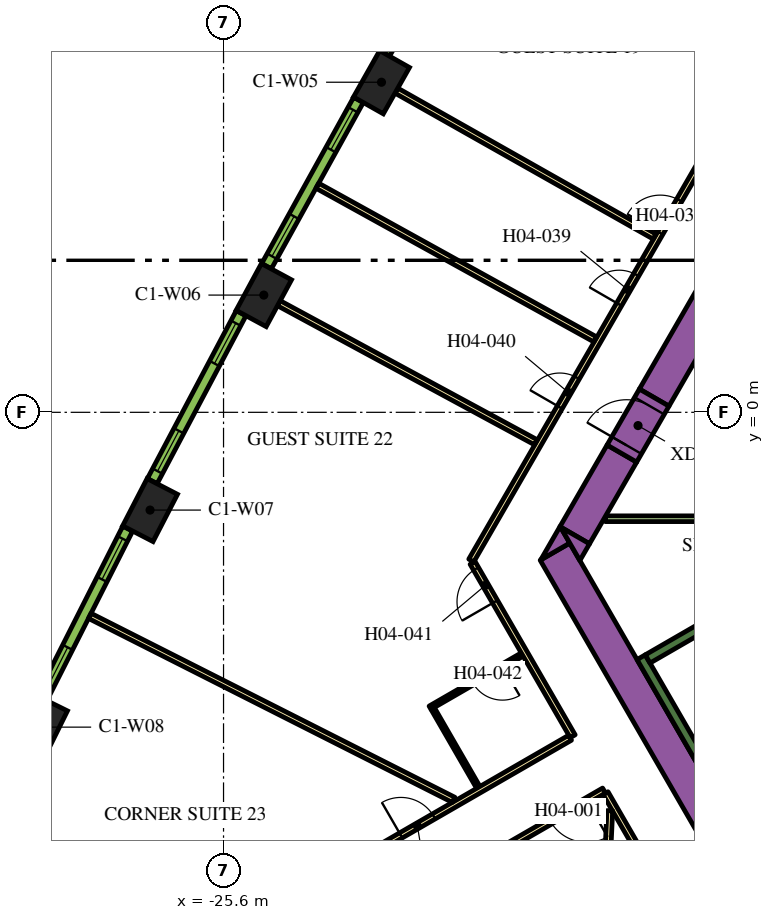
"""IFC4 building model, lengths in metres.
Left out: names, types, materials, properties, quantities, classifications, styles, units other than length and angle.
Written with IfcOpenShell. Run it as: python <this file> out.ifc"""

import sys

from ifc_helpers import new_model, si_unit, direction, frame, frame_2d, origin, origin_2d, place, context, subcontext, project, spatial, polyline, rectangle, outline, extrude, element, fill, save


model = new_model("IFC4")
c1 = context("Model", 3, precision=1e-05, world=origin(), true_north=direction((0.0, 1.0)))
c2 = subcontext(c1, "Body", "Model", "MODEL_VIEW")
j1 = project(units=[si_unit("LENGTHUNIT", "METRE"), si_unit("PLANEANGLEUNIT", "RADIAN")], contexts=[c1])
p1 = place(None, origin())
s1 = spatial("IfcSite", under=j1, at=p1, CompositionType="ELEMENT")
p2 = place(p1, origin())
s2 = spatial("IfcBuilding", under=s1, at=p2, CompositionType="ELEMENT")
p3 = place(p2, frame((0.0, 0.0, 62.7)))
s3 = spatial("IfcBuildingStorey", under=s2, at=p3, CompositionType="ELEMENT", Elevation=62.7)
for number, where, z_axis, x_axis in (
    (1, (-21.443, 8.685, 0.0), (0.0, 0.0, 1.0), (-0.492, -0.871, 0.0)),
    (2, (-24.54, 3.085, 0.0), (0.0, 0.0, 1.0), (-0.476, -0.88, 0.0)),
    (3, (-27.533, -2.572, 0.0), (0.0, 0.0, 1.0), (-0.459, -0.888, 0.0)),
    (4, (-30.421, -8.284, 0.0), (0.0, 0.0, 1.0), (-0.443, -0.897, 0.0)),
):
    element("IfcColumn", number, at=place(p3, frame(where, z_axis=z_axis, x_axis=x_axis)), inside=s3, PredefinedType="COLUMN", context=c2, shape_type="SweptSolid", body=[
        extrude(rectangle(XDim=1.4, YDim=0.9, at=origin_2d()), origin(), (0.0, 0.0, 1.0), 3.9),
    ])
p4 = place(p3, frame((-14.268, 0.387, 0.0), z_axis=(0.0, 0.0, 1.0), x_axis=(0.499994617707, 0.866028511231, 0.0)))
e5 = element("IfcWall", 5, at=p4, inside=s3, PredefinedType="SOLIDWALL", context=c2, shape_type="SweptSolid", body=[
    extrude(rectangle(XDim=18.817, YDim=0.9, at=frame_2d((9.409, 0.0))), origin(), (0.0, 0.0, 1.0), 3.9),
])
p5 = place(p3, frame((-12.134, -11.883, 0.0), z_axis=(0.0, 0.0, 1.0), x_axis=(-0.500005339912, 0.866022320763, 0.0)))
e6 = element("IfcWall", 6, at=p5, inside=s3, PredefinedType="SOLIDWALL", context=c2, shape_type="SweptSolid", body=[
    extrude(rectangle(XDim=9.488, YDim=0.9, at=frame_2d((4.744, 0.0))), origin(), (0.0, 0.0, 1.0), 3.9),
])
p6 = place(p3, origin())
e7 = element("IfcWall", 7, at=p6, inside=s3, PredefinedType="SOLIDWALL", context=c2, shape_type="SweptSolid", body=[
    extrude(outline(polyline([(-16.489, -3.44), (-17.251, -3.88), (-16.743, -3.0), (-16.489, -3.44)])), origin(), (0.0, 0.0, 1.0), 3.9),
])
p7 = place(p3, frame((-15.118, -1.085, 0.0), z_axis=(0.0, 0.0, 1.0), x_axis=(-0.50006606081, -0.865987260198, 0.0)))
e8 = element("IfcWall", 8, at=p7, inside=s3, PredefinedType="SOLIDWALL", context=c2, shape_type="SweptSolid", body=[
    extrude(rectangle(XDim=2.481, YDim=0.9, at=frame_2d((1.24, 0.0))), origin(), (0.0, 0.0, 1.0), 3.9),
])
e9 = element("IfcWall", 9, at=p6, inside=s3, PredefinedType="SOLIDWALL", context=c2, shape_type="SweptSolid", body=[
    extrude(outline(polyline([(-16.223, -3.9), (-16.732, -3.02), (-15.969, -3.46), (-16.223, -3.9)])), origin(), (0.0, 0.0, 1.0), 3.9),
])
p8 = place(p3, frame((-12.885, -9.431, 0.0), z_axis=(0.0, 0.0, 1.0), x_axis=(-0.500020560727, 0.866013532718, 0.0)))
e10 = element("IfcWall", 10, at=p8, inside=s3, PredefinedType="SOLIDWALL", context=c2, shape_type="SweptSolid", body=[
    extrude(rectangle(XDim=3.45, YDim=0.25, at=frame_2d((1.725, 0.0))), origin(), (0.0, 0.0, 1.0), 3.9),
])
p9 = place(p3, frame((-14.44, -6.49, 0.0), z_axis=(0.0, 0.0, 1.0), x_axis=(0.866022966069, 0.500004222222, 0.0)))
e11 = element("IfcWall", 11, at=p9, inside=s3, PredefinedType="SOLIDWALL", context=c2, shape_type="SweptSolid", body=[
    extrude(rectangle(XDim=6.8, YDim=0.25, at=frame_2d((3.4, 0.0))), origin(), (0.0, 0.0, 1.0), 3.9),
])
p10 = place(p3, frame((-12.915, -2.8, 0.0), z_axis=(0.0, 0.0, 1.0), x_axis=(-1.0, 0.0, 0.0)))
e12 = element("IfcWall", 12, at=p10, inside=s3, PredefinedType="PARTITIONING", context=c2, shape_type="SweptSolid", body=[
    extrude(rectangle(XDim=2.637, YDim=0.15, at=frame_2d((1.318, 0.0))), origin(), (0.0, 0.0, 1.0), 2.75),
])
p11 = place(p3, frame((-15.118, -1.085, 0.0), z_axis=(0.0, 0.0, 1.0), x_axis=(0.500000056704, 0.866025371046, 0.0)))
e13 = element("IfcWall", 13, at=p11, inside=s3, PredefinedType="SOLIDWALL", context=c2, shape_type="SweptSolid", body=[
    extrude(rectangle(XDim=1.7, YDim=0.9, at=frame_2d((0.85, 0.0))), origin(), (0.0, 0.0, 1.0), 3.9),
])
p12 = place(p11, frame((0.25, 0.0, 0.0)))
e14 = element("IfcOpeningElement", 14, at=p12, cuts=e13, PredefinedType="OPENING", context=c2, shape_type="SweptSolid", body=[
    extrude(rectangle(XDim=1.2, YDim=2.1, at=frame_2d((0.6, 1.05))), frame((0.0, 0.46, 0.0), z_axis=(0.0, -1.0, 0.0), x_axis=(1.0, 0.0, 0.0)), (0.0, 0.0, 1.0), 0.92),
])
p13 = place(p3, frame((-19.081, -3.9, 0.0), z_axis=(0.0, 0.0, 1.0), x_axis=(0.499998313975, 0.866026377209, 0.0)))
e15 = element("IfcWall", 15, at=p13, inside=s3, PredefinedType="PARTITIONING", context=c2, shape_type="SweptSolid", body=[
    extrude(rectangle(XDim=25.766, YDim=0.15, at=frame_2d((12.883, 0.0))), origin(), (0.0, 0.0, 1.0), 2.75),
])
p14 = place(p13, frame((24.586, 0.0, 0.0)))
e16 = element("IfcOpeningElement", 16, at=p14, cuts=e15, PredefinedType="OPENING", context=c2, shape_type="SweptSolid", body=[
    extrude(rectangle(XDim=1.0, YDim=2.1, at=frame_2d((0.5, 1.05))), frame((0.0, 0.085, 0.0), z_axis=(0.0, -1.0, 0.0), x_axis=(1.0, 0.0, 0.0)), (0.0, 0.0, 1.0), 0.17),
])
p15 = place(p13, frame((9.948, 0.0, 0.0)))
e17 = element("IfcOpeningElement", 17, at=p15, cuts=e15, PredefinedType="OPENING", context=c2, shape_type="SweptSolid", body=[
    extrude(rectangle(XDim=1.0, YDim=2.1, at=frame_2d((0.5, 1.05))), frame((0.0, 0.085, 0.0), z_axis=(0.0, -1.0, 0.0), x_axis=(1.0, 0.0, 0.0)), (0.0, 0.0, 1.0), 0.17),
])
p16 = place(p13, frame((7.782, 0.0, 0.0)))
e18 = element("IfcOpeningElement", 18, at=p16, cuts=e15, PredefinedType="OPENING", context=c2, shape_type="SweptSolid", body=[
    extrude(rectangle(XDim=0.9, YDim=2.1, at=frame_2d((0.45, 1.05))), frame((0.0, 0.085, 0.0), z_axis=(0.0, -1.0, 0.0), x_axis=(1.0, 0.0, 0.0)), (0.0, 0.0, 1.0), 0.17),
])
p17 = place(p13, frame((4.658, 0.0, 0.0)))
e19 = element("IfcOpeningElement", 19, at=p17, cuts=e15, PredefinedType="OPENING", context=c2, shape_type="SweptSolid", body=[
    extrude(rectangle(XDim=0.9, YDim=2.1, at=frame_2d((0.45, 1.05))), frame((0.0, 0.085, 0.0), z_axis=(0.0, -1.0, 0.0), x_axis=(1.0, 0.0, 0.0)), (0.0, 0.0, 1.0), 0.17),
])
p18 = place(p3, frame((-16.412, -8.523, 0.0), z_axis=(0.0, 0.0, 1.0), x_axis=(-0.500001929737, 0.866024289647, 0.0)))
e20 = element("IfcWall", 20, at=p18, inside=s3, PredefinedType="PARTITIONING", context=c2, shape_type="SweptSolid", body=[
    extrude(rectangle(XDim=5.268, YDim=0.15, at=frame_2d((2.634, 0.0))), origin(), (0.0, 0.0, 1.0), 2.75),
])
p19 = place(p18, frame((4.088, 0.0, 0.0)))
e21 = element("IfcOpeningElement", 21, at=p19, cuts=e20, PredefinedType="OPENING", context=c2, shape_type="SweptSolid", body=[
    extrude(rectangle(XDim=1.0, YDim=2.1, at=frame_2d((0.5, 1.05))), frame((0.0, 0.085, 0.0), z_axis=(0.0, -1.0, 0.0), x_axis=(1.0, 0.0, 0.0)), (0.0, 0.0, 1.0), 0.17),
])
p20 = place(p3, frame((-30.463, -16.635, 0.0), z_axis=(0.0, 0.0, 1.0), x_axis=(0.866022394896, 0.500005211512, 0.0)))
e22 = element("IfcWall", 22, at=p20, inside=s3, PredefinedType="PARTITIONING", context=c2, shape_type="SweptSolid", body=[
    extrude(rectangle(XDim=16.144, YDim=0.15, at=frame_2d((8.072, 0.0))), origin(), (0.0, 0.0, 1.0), 2.75),
])
p21 = place(p20, frame((11.004, 0.0, 0.0)))
e23 = element("IfcOpeningElement", 23, at=p21, cuts=e22, PredefinedType="OPENING", context=c2, shape_type="SweptSolid", body=[
    extrude(rectangle(XDim=1.0, YDim=2.1, at=frame_2d((0.5, 1.05))), frame((0.0, 0.085, 0.0), z_axis=(0.0, -1.0, 0.0), x_axis=(1.0, 0.0, 0.0)), (0.0, 0.0, 1.0), 0.17),
])
p22 = place(p3, frame((-15.587, -9.952, 0.0), z_axis=(0.0, 0.0, 1.0), x_axis=(-0.866022197818, -0.500005552856, 0.0)))
e24 = element("IfcWall", 24, at=p22, inside=s3, PredefinedType="PARTITIONING", context=c2, shape_type="SweptSolid", body=[
    extrude(rectangle(XDim=16.224, YDim=0.15, at=frame_2d((8.112, 0.0))), origin(), (0.0, 0.0, 1.0), 2.75),
])
p23 = place(p22, frame((0.527, 0.0, 0.0)))
e25 = element("IfcOpeningElement", 25, at=p23, cuts=e24, PredefinedType="OPENING", context=c2, shape_type="SweptSolid", body=[
    extrude(rectangle(XDim=1.1, YDim=2.1, at=frame_2d((0.55, 1.05))), frame((0.0, 0.085, 0.0), z_axis=(0.0, -1.0, 0.0), x_axis=(1.0, 0.0, 0.0)), (0.0, 0.0, 1.0), 0.17),
])
p24 = place(p3, frame((-12.918, -14.575, 0.0), z_axis=(0.0, 0.0, 1.0), x_axis=(-0.500009150678, 0.866020120573, 0.0)))
e26 = element("IfcWall", 26, at=p24, inside=s3, PredefinedType="PARTITIONING", context=c2, shape_type="SweptSolid", body=[
    extrude(rectangle(XDim=5.258, YDim=0.15, at=frame_2d((2.629, 0.0))), origin(), (0.0, 0.0, 1.0), 2.75),
])
p25 = place(p3, frame((-29.12, -5.356, 0.0), z_axis=(0.0, 0.0, 1.0), x_axis=(0.892401965553, -0.451241323327, 0.0)))
e27 = element("IfcWall", 27, at=p25, inside=s3, PredefinedType="PARTITIONING", context=c2, shape_type="SweptSolid", body=[
    extrude(rectangle(XDim=10.729, YDim=0.15, at=frame_2d((5.364, 0.0))), origin(), (0.0, 0.0, 1.0), 2.75),
])
p26 = place(p3, frame((-24.145, 2.871, 0.0), z_axis=(0.0, 0.0, 1.0), x_axis=(0.879551725039, -0.475803281809, 0.0)))
e28 = element("IfcWall", 28, at=p26, inside=s3, PredefinedType="PARTITIONING", context=c2, shape_type="SweptSolid", body=[
    extrude(rectangle(XDim=7.688, YDim=0.15, at=frame_2d((3.844, 0.0))), origin(), (0.0, 0.0, 1.0), 2.75),
])
p27 = place(p3, frame((-23.132, 5.962, 0.0), z_axis=(0.0, 0.0, 1.0), x_axis=(0.875121716713, -0.483902863121, 0.0)))
e29 = element("IfcWall", 29, at=p27, inside=s3, PredefinedType="PARTITIONING", context=c2, shape_type="SweptSolid", body=[
    extrude(rectangle(XDim=8.355, YDim=0.15, at=frame_2d((4.178, 0.0))), origin(), (0.0, 0.0, 1.0), 2.75),
])
p28 = place(p3, frame((-15.973, -22.109, 0.0), z_axis=(0.0, 0.0, 1.0), x_axis=(0.046191717129, 0.998932592955, 0.0)))
e30 = element("IfcWall", 30, at=p28, inside=s3, PredefinedType="PARTITIONING", context=c2, shape_type="SweptSolid", body=[
    extrude(rectangle(XDim=11.638, YDim=0.15, at=frame_2d((5.819, 0.0))), origin(), (0.0, 0.0, 1.0), 2.75),
])
p29 = place(p3, frame((-21.052, 8.464, 0.0), z_axis=(0.0, 0.0, 1.0), x_axis=(0.87059371954, -0.492002617368, 0.0)))
e31 = element("IfcWall", 31, at=p29, inside=s3, PredefinedType="PARTITIONING", context=c2, shape_type="SweptSolid", body=[
    extrude(rectangle(XDim=7.803, YDim=0.15, at=frame_2d((3.902, 0.0))), origin(), (0.0, 0.0, 1.0), 2.75),
])
p30 = place(p3, frame((-17.74, -6.373, 0.0), z_axis=(0.0, 0.0, 1.0), x_axis=(-0.866018616679, -0.500011755427, 0.0)))
e32 = element("IfcWall", 32, at=p30, inside=s3, PredefinedType="PARTITIONING", context=c2, shape_type="SweptSolid", body=[
    extrude(rectangle(XDim=2.8, YDim=0.1, at=frame_2d((1.4, 0.0))), origin(), (0.0, 0.0, 1.0), 2.75),
])
p31 = place(p30, frame((0.6, 0.0, 0.0)))
e33 = element("IfcOpeningElement", 33, at=p31, cuts=e32, PredefinedType="OPENING", context=c2, shape_type="SweptSolid", body=[
    extrude(rectangle(XDim=0.9, YDim=2.1, at=frame_2d((0.45, 1.05))), frame((0.0, 0.06, 0.0), z_axis=(0.0, -1.0, 0.0), x_axis=(1.0, 0.0, 0.0)), (0.0, 0.0, 1.0), 0.12),
])
p32 = place(p3, frame((-20.092, -7.8, 0.0), z_axis=(0.0, 0.0, 1.0), x_axis=(0.499940577336, -0.866059708757, 0.0)))
e34 = element("IfcWall", 34, at=p32, inside=s3, PredefinedType="PARTITIONING", context=c2, shape_type="SweptSolid", body=[
    extrude(rectangle(XDim=2.39, YDim=0.1, at=frame_2d((1.195, 0.0))), origin(), (0.0, 0.0, 1.0), 2.75),
])
p33 = place(p3, frame((-18.858, 13.773, 0.0), z_axis=(0.0, 0.0, 1.0), x_axis=(-0.50002123722, -0.866013142123, 0.0)))
e35 = element("IfcWall", 35, at=p33, inside=s3, PredefinedType="SOLIDWALL", context=c2, shape_type="SweptSolid", body=[
    extrude(rectangle(XDim=4.998, YDim=0.29, at=frame_2d((2.499, 0.0))), origin(), (0.0, 0.0, 1.0), 3.65),
])
p34 = place(p33, frame((0.297, 0.0, 0.9)))
e36 = element("IfcOpeningElement", 36, at=p34, cuts=e35, PredefinedType="OPENING", context=c2, shape_type="SweptSolid", body=[
    extrude(rectangle(XDim=1.2, YDim=2.15, at=frame_2d((0.6, 1.075))), frame((0.0, 0.155, 0.0), z_axis=(0.0, -1.0, 0.0), x_axis=(1.0, 0.0, 0.0)), (0.0, 0.0, 1.0), 0.31),
])
p35 = place(p33, frame((3.501, 0.0, 0.9)))
e37 = element("IfcOpeningElement", 37, at=p35, cuts=e35, PredefinedType="OPENING", context=c2, shape_type="SweptSolid", body=[
    extrude(rectangle(XDim=1.2, YDim=2.15, at=frame_2d((0.6, 1.075))), frame((0.0, 0.155, 0.0), z_axis=(0.0, -1.0, 0.0), x_axis=(1.0, 0.0, 0.0)), (0.0, 0.0, 1.0), 0.31),
])
p36 = place(p3, frame((-22.05, 8.22, 0.0), z_axis=(0.0, 0.0, 1.0), x_axis=(-0.483912572871, -0.875116347589, 0.0)))
e38 = element("IfcWall", 38, at=p36, inside=s3, PredefinedType="SOLIDWALL", context=c2, shape_type="SweptSolid", body=[
    extrude(rectangle(XDim=4.998, YDim=0.29, at=frame_2d((2.499, 0.0))), origin(), (0.0, 0.0, 1.0), 3.65),
])
p37 = place(p36, frame((0.297, 0.0, 0.9)))
e39 = element("IfcOpeningElement", 39, at=p37, cuts=e38, PredefinedType="OPENING", context=c2, shape_type="SweptSolid", body=[
    extrude(rectangle(XDim=1.2, YDim=2.15, at=frame_2d((0.6, 1.075))), frame((0.0, 0.155, 0.0), z_axis=(0.0, -1.0, 0.0), x_axis=(1.0, 0.0, 0.0)), (0.0, 0.0, 1.0), 0.31),
])
p38 = place(p36, frame((3.501, 0.0, 0.9)))
e40 = element("IfcOpeningElement", 40, at=p38, cuts=e38, PredefinedType="OPENING", context=c2, shape_type="SweptSolid", body=[
    extrude(rectangle(XDim=1.2, YDim=2.15, at=frame_2d((0.6, 1.075))), frame((0.0, 0.155, 0.0), z_axis=(0.0, -1.0, 0.0), x_axis=(1.0, 0.0, 0.0)), (0.0, 0.0, 1.0), 0.31),
])
p39 = place(p3, frame((-25.138, 2.608, 0.0), z_axis=(0.0, 0.0, 1.0), x_axis=(-0.467629620899, -0.883924509026, 0.0)))
e41 = element("IfcWall", 41, at=p39, inside=s3, PredefinedType="SOLIDWALL", context=c2, shape_type="SweptSolid", body=[
    extrude(rectangle(XDim=4.998, YDim=0.29, at=frame_2d((2.499, 0.0))), origin(), (0.0, 0.0, 1.0), 3.65),
])
p40 = place(p39, frame((0.297, 0.0, 0.9)))
e42 = element("IfcOpeningElement", 42, at=p40, cuts=e41, PredefinedType="OPENING", context=c2, shape_type="SweptSolid", body=[
    extrude(rectangle(XDim=1.2, YDim=2.15, at=frame_2d((0.6, 1.075))), frame((0.0, 0.155, 0.0), z_axis=(0.0, -1.0, 0.0), x_axis=(1.0, 0.0, 0.0)), (0.0, 0.0, 1.0), 0.31),
])
p41 = place(p39, frame((3.501, 0.0, 0.9)))
e43 = element("IfcOpeningElement", 43, at=p41, cuts=e41, PredefinedType="OPENING", context=c2, shape_type="SweptSolid", body=[
    extrude(rectangle(XDim=1.2, YDim=2.15, at=frame_2d((0.6, 1.075))), frame((0.0, 0.155, 0.0), z_axis=(0.0, -1.0, 0.0), x_axis=(1.0, 0.0, 0.0)), (0.0, 0.0, 1.0), 0.31),
])
p42 = place(p3, frame((-28.122, -3.06, 0.0), z_axis=(0.0, 0.0, 1.0), x_axis=(-0.451233929645, -0.892405704115, 0.0)))
e44 = element("IfcWall", 44, at=p42, inside=s3, PredefinedType="SOLIDWALL", context=c2, shape_type="SweptSolid", body=[
    extrude(rectangle(XDim=4.998, YDim=0.29, at=frame_2d((2.499, 0.0))), origin(), (0.0, 0.0, 1.0), 3.65),
])
p43 = place(p42, frame((0.297, 0.0, 0.9)))
e45 = element("IfcOpeningElement", 45, at=p43, cuts=e44, PredefinedType="OPENING", context=c2, shape_type="SweptSolid", body=[
    extrude(rectangle(XDim=1.2, YDim=2.15, at=frame_2d((0.6, 1.075))), frame((0.0, 0.155, 0.0), z_axis=(0.0, -1.0, 0.0), x_axis=(1.0, 0.0, 0.0)), (0.0, 0.0, 1.0), 0.31),
])
p44 = place(p42, frame((3.501, 0.0, 0.9)))
e46 = element("IfcOpeningElement", 46, at=p44, cuts=e44, PredefinedType="OPENING", context=c2, shape_type="SweptSolid", body=[
    extrude(rectangle(XDim=1.2, YDim=2.15, at=frame_2d((0.6, 1.075))), frame((0.0, 0.155, 0.0), z_axis=(0.0, -1.0, 0.0), x_axis=(1.0, 0.0, 0.0)), (0.0, 0.0, 1.0), 0.31),
])
p45 = place(p12, origin())
e47 = element("IfcDoor", 47, at=p45, inside=s3, OperationType="SINGLE_SWING_LEFT", PredefinedType="DOOR", context=c2, shape_type="SweptSolid", body=[
    extrude(rectangle(XDim=1.2, YDim=2.1, at=frame_2d((0.6, 1.05))), frame((0.0, 0.025, 0.0), z_axis=(0.0, -1.0, 0.0), x_axis=(1.0, 0.0, 0.0)), (0.0, 0.0, 1.0), 0.05),
])
fill(e14, e47)
p46 = place(p23, origin())
e48 = element("IfcDoor", 48, at=p46, inside=s3, OperationType="SINGLE_SWING_LEFT", PredefinedType="DOOR", context=c2, shape_type="SweptSolid", body=[
    extrude(rectangle(XDim=1.1, YDim=2.1, at=frame_2d((0.55, 1.05))), frame((0.0, 0.025, 0.0), z_axis=(0.0, -1.0, 0.0), x_axis=(1.0, 0.0, 0.0)), (0.0, 0.0, 1.0), 0.05),
])
fill(e25, e48)
p47 = place(p15, origin())
e49 = element("IfcDoor", 49, at=p47, inside=s3, OperationType="SINGLE_SWING_LEFT", PredefinedType="DOOR", context=c2, shape_type="SweptSolid", body=[
    extrude(rectangle(XDim=1.0, YDim=2.1, at=frame_2d((0.5, 1.05))), frame((0.0, 0.025, 0.0), z_axis=(0.0, -1.0, 0.0), x_axis=(1.0, 0.0, 0.0)), (0.0, 0.0, 1.0), 0.05),
])
fill(e17, e49)
p48 = place(p16, origin())
e50 = element("IfcDoor", 50, at=p48, inside=s3, OperationType="SINGLE_SWING_RIGHT", PredefinedType="DOOR", context=c2, shape_type="SweptSolid", body=[
    extrude(rectangle(XDim=0.9, YDim=2.1, at=frame_2d((0.45, 1.05))), frame((0.0, 0.025, 0.0), z_axis=(0.0, -1.0, 0.0), x_axis=(1.0, 0.0, 0.0)), (0.0, 0.0, 1.0), 0.05),
])
fill(e18, e50)
p49 = place(p17, origin())
e51 = element("IfcDoor", 51, at=p49, inside=s3, OperationType="SINGLE_SWING_LEFT", PredefinedType="DOOR", context=c2, shape_type="SweptSolid", body=[
    extrude(rectangle(XDim=0.9, YDim=2.1, at=frame_2d((0.45, 1.05))), frame((0.0, 0.025, 0.0), z_axis=(0.0, -1.0, 0.0), x_axis=(1.0, 0.0, 0.0)), (0.0, 0.0, 1.0), 0.05),
])
fill(e19, e51)
p50 = place(p19, origin())
e52 = element("IfcDoor", 52, at=p50, inside=s3, OperationType="SINGLE_SWING_RIGHT", PredefinedType="DOOR", context=c2, shape_type="SweptSolid", body=[
    extrude(rectangle(XDim=1.0, YDim=2.1, at=frame_2d((0.5, 1.05))), frame((0.0, 0.025, 0.0), z_axis=(0.0, -1.0, 0.0), x_axis=(1.0, 0.0, 0.0)), (0.0, 0.0, 1.0), 0.05),
])
fill(e21, e52)
p51 = place(p31, origin())
e53 = element("IfcDoor", 53, at=p51, inside=s3, OperationType="SINGLE_SWING_LEFT", PredefinedType="DOOR", context=c2, shape_type="SweptSolid", body=[
    extrude(rectangle(XDim=0.9, YDim=2.1, at=frame_2d((0.45, 1.05))), frame((0.0, 0.025, 0.0), z_axis=(0.0, -1.0, 0.0), x_axis=(1.0, 0.0, 0.0)), (0.0, 0.0, 1.0), 0.05),
])
fill(e33, e53)
p52 = place(p21, origin())
e54 = element("IfcDoor", 54, at=p52, inside=s3, OperationType="SINGLE_SWING_RIGHT", PredefinedType="DOOR", context=c2, shape_type="SweptSolid", body=[
    extrude(rectangle(XDim=1.0, YDim=2.1, at=frame_2d((0.5, 1.05))), frame((0.0, 0.025, 0.0), z_axis=(0.0, -1.0, 0.0), x_axis=(1.0, 0.0, 0.0)), (0.0, 0.0, 1.0), 0.05),
])
fill(e23, e54)
p53 = place(p37, origin())
e55 = element("IfcWindow", 55, at=p53, inside=s3, PartitioningType="DOUBLE_PANEL_VERTICAL", PredefinedType="WINDOW", context=c2, shape_type="SweptSolid", body=[
    extrude(rectangle(XDim=1.2, YDim=2.15, at=frame_2d((0.6, 1.075))), frame((0.0, 0.015, 0.0), z_axis=(0.0, -1.0, 0.0), x_axis=(1.0, 0.0, 0.0)), (0.0, 0.0, 1.0), 0.06),
])
fill(e39, e55)
p54 = place(p38, origin())
e56 = element("IfcWindow", 56, at=p54, inside=s3, PartitioningType="DOUBLE_PANEL_VERTICAL", PredefinedType="WINDOW", context=c2, shape_type="SweptSolid", body=[
    extrude(rectangle(XDim=1.2, YDim=2.15, at=frame_2d((0.6, 1.075))), frame((0.0, 0.015, 0.0), z_axis=(0.0, -1.0, 0.0), x_axis=(1.0, 0.0, 0.0)), (0.0, 0.0, 1.0), 0.06),
])
fill(e40, e56)
p55 = place(p40, origin())
e57 = element("IfcWindow", 57, at=p55, inside=s3, PartitioningType="DOUBLE_PANEL_VERTICAL", PredefinedType="WINDOW", context=c2, shape_type="SweptSolid", body=[
    extrude(rectangle(XDim=1.2, YDim=2.15, at=frame_2d((0.6, 1.075))), frame((0.0, 0.015, 0.0), z_axis=(0.0, -1.0, 0.0), x_axis=(1.0, 0.0, 0.0)), (0.0, 0.0, 1.0), 0.06),
])
fill(e42, e57)
p56 = place(p41, origin())
e58 = element("IfcWindow", 58, at=p56, inside=s3, PartitioningType="DOUBLE_PANEL_VERTICAL", PredefinedType="WINDOW", context=c2, shape_type="SweptSolid", body=[
    extrude(rectangle(XDim=1.2, YDim=2.15, at=frame_2d((0.6, 1.075))), frame((0.0, 0.015, 0.0), z_axis=(0.0, -1.0, 0.0), x_axis=(1.0, 0.0, 0.0)), (0.0, 0.0, 1.0), 0.06),
])
fill(e43, e58)
p57 = place(p43, origin())
e59 = element("IfcWindow", 59, at=p57, inside=s3, PartitioningType="DOUBLE_PANEL_VERTICAL", PredefinedType="WINDOW", context=c2, shape_type="SweptSolid", body=[
    extrude(rectangle(XDim=1.2, YDim=2.15, at=frame_2d((0.6, 1.075))), frame((0.0, 0.015, 0.0), z_axis=(0.0, -1.0, 0.0), x_axis=(1.0, 0.0, 0.0)), (0.0, 0.0, 1.0), 0.06),
])
fill(e45, e59)
p58 = place(p44, origin())
e60 = element("IfcWindow", 60, at=p58, inside=s3, PartitioningType="DOUBLE_PANEL_VERTICAL", PredefinedType="WINDOW", context=c2, shape_type="SweptSolid", body=[
    extrude(rectangle(XDim=1.2, YDim=2.15, at=frame_2d((0.6, 1.075))), frame((0.0, 0.015, 0.0), z_axis=(0.0, -1.0, 0.0), x_axis=(1.0, 0.0, 0.0)), (0.0, 0.0, 1.0), 0.06),
])
fill(e46, e60)
save(model, sys.argv[1])
